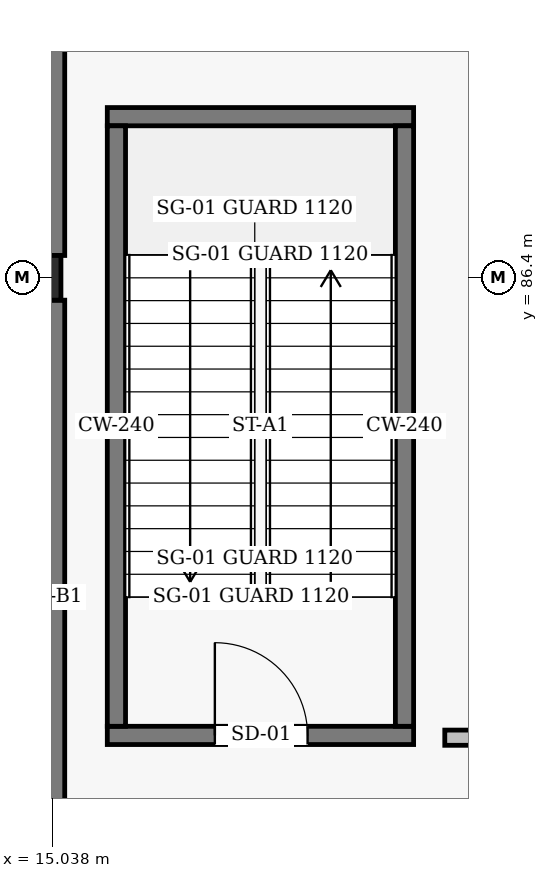
"""IFC4 building model, lengths in metres.
Left out: names, types, materials, properties, quantities, classifications, styles, units other than length and angle.
Written with IfcOpenShell. Run it as: python <this file> out.ifc"""

import sys

from ifc_helpers import new_model, si_unit, direction, frame, frame_2d, origin, origin_2d, place, context, subcontext, project, spatial, rectangle, i_section, extrude, element, fill, save


model = new_model("IFC4")
c1 = context("Model", 3, precision=1e-05, world=origin(), true_north=direction((0.0, 1.0)))
c2 = subcontext(c1, "Body", "Model", "MODEL_VIEW")
j1 = project(units=[si_unit("LENGTHUNIT", "METRE"), si_unit("PLANEANGLEUNIT", "RADIAN")], contexts=[c1])
p1 = place(None, origin())
s1 = spatial("IfcSite", under=j1, at=p1, CompositionType="ELEMENT")
p2 = place(p1, origin())
s2 = spatial("IfcBuilding", under=s1, at=p2, CompositionType="ELEMENT")
p3 = place(p2, frame((0.0, 0.0, -4.8)))
s3 = spatial("IfcBuildingStorey", under=s2, at=p3, CompositionType="ELEMENT", Elevation=-4.8)
p4 = place(p3, frame((15.0, 86.4, 0.0), z_axis=(0.0, 0.0, 1.0), x_axis=(1.0, 0.0, 0.0)))
e1 = element("IfcColumn", 1, at=p4, inside=s3, PredefinedType="COLUMN", context=c2, shape_type="SweptSolid", body=[
    extrude(i_section(OverallWidth=0.3, OverallDepth=0.588, WebThickness=0.012, FlangeThickness=0.02, FilletRadius=0.024, at=origin_2d()), origin(), (0.0, 0.0, 1.0), 4.8),
])
p5 = place(p3, frame((15.0, 94.506, 0.0), z_axis=(0.0, 0.0, 1.0), x_axis=(0.0, -1.0, 0.0)))
e2 = element("IfcWall", 2, at=p5, inside=s3, PredefinedType="SOLIDWALL", context=c2, shape_type="SweptSolid", body=[
    extrude(rectangle(XDim=7.812, YDim=0.4, at=frame_2d((3.906, 0.0))), origin(), (0.0, 0.0, 1.0), 3.84),
])
p6 = place(p3, frame((15.0, 86.106, 0.0), z_axis=(0.0, 0.0, 1.0), x_axis=(0.0, -1.0, 0.0)))
e3 = element("IfcWall", 3, at=p6, inside=s3, PredefinedType="SOLIDWALL", context=c2, shape_type="SweptSolid", body=[
    extrude(rectangle(XDim=7.815, YDim=0.4, at=frame_2d((3.907, 0.0))), origin(), (0.0, 0.0, 1.0), 3.84),
])
p7 = place(p3, frame((15.76, 80.38, 0.0), z_axis=(0.0, 0.0, 1.0), x_axis=(1.0, 0.0, 0.0)))
e4 = element("IfcWall", 4, at=p7, inside=s3, PredefinedType="SHEAR", context=c2, shape_type="SweptSolid", body=[
    extrude(rectangle(XDim=4.03, YDim=0.24, at=frame_2d((2.015, 0.0))), origin(), (0.0, 0.0, 1.0), 4.54),
])
p8 = place(p7, frame((1.415, 0.0, 0.0)))
e5 = element("IfcOpeningElement", 5, at=p8, cuts=e4, PredefinedType="OPENING", context=c2, shape_type="SweptSolid", body=[
    extrude(rectangle(XDim=1.22, YDim=2.18, at=frame_2d((0.61, 1.09))), frame((0.0, 0.13, 0.0), z_axis=(0.0, -1.0, 0.0), x_axis=(1.0, 0.0, 0.0)), (0.0, 0.0, 1.0), 0.26),
])
p9 = place(p3, frame((15.76, 88.52, 0.0), z_axis=(0.0, 0.0, 1.0), x_axis=(1.0, 0.0, 0.0)))
e6 = element("IfcWall", 6, at=p9, inside=s3, PredefinedType="SHEAR", context=c2, shape_type="SweptSolid", body=[
    extrude(rectangle(XDim=4.03, YDim=0.24, at=frame_2d((2.015, 0.0))), origin(), (0.0, 0.0, 1.0), 4.54),
])
for number, where, z_axis, x_axis in (
    (7, (15.88, 80.5, 0.0), (0.0, 0.0, 1.0), (0.0, 1.0, 0.0)),
    (8, (19.67, 80.5, 0.0), (0.0, 0.0, 1.0), (0.0, 1.0, 0.0)),
):
    element("IfcWall", number, at=place(p3, frame(where, z_axis=z_axis, x_axis=x_axis)), inside=s3, PredefinedType="SHEAR", context=c2, shape_type="SweptSolid", body=[
        extrude(rectangle(XDim=7.9, YDim=0.24, at=frame_2d((3.95, 0.0))), origin(), (0.0, 0.0, 1.0), 4.54),
    ])
p10 = place(p3, frame((20.2, 80.35, 0.0), z_axis=(0.0, 0.0, 1.0), x_axis=(1.0, 0.0, 0.0)))
e9 = element("IfcWall", 9, at=p10, inside=s3, PredefinedType="SOLIDWALL", context=c2, shape_type="SweptSolid", body=[
    extrude(rectangle(XDim=34.4, YDim=0.2, at=frame_2d((17.2, 0.0))), origin(), (0.0, 0.0, 1.0), 3.84),
])
p11 = place(p10, frame((16.5, 0.0, 0.0)))
e10 = element("IfcOpeningElement", 10, at=p11, cuts=e9, PredefinedType="OPENING", context=c2, shape_type="SweptSolid", body=[
    extrude(rectangle(XDim=1.38, YDim=2.15, at=frame_2d((0.69, 1.075))), frame((0.0, 0.11, 0.0), z_axis=(0.0, -1.0, 0.0), x_axis=(1.0, 0.0, 0.0)), (0.0, 0.0, 1.0), 0.22),
])
p12 = place(p8, origin())
e11 = element("IfcDoor", 11, at=p12, inside=s3, OperationType="SINGLE_SWING_LEFT", PredefinedType="DOOR", context=c2, shape_type="SweptSolid", body=[
    extrude(rectangle(XDim=1.22, YDim=2.18, at=frame_2d((0.61, 1.09))), frame((0.0, 0.025, 0.0), z_axis=(0.0, -1.0, 0.0), x_axis=(1.0, 0.0, 0.0)), (0.0, 0.0, 1.0), 0.05),
])
fill(e5, e11)
save(model, sys.argv[1])
